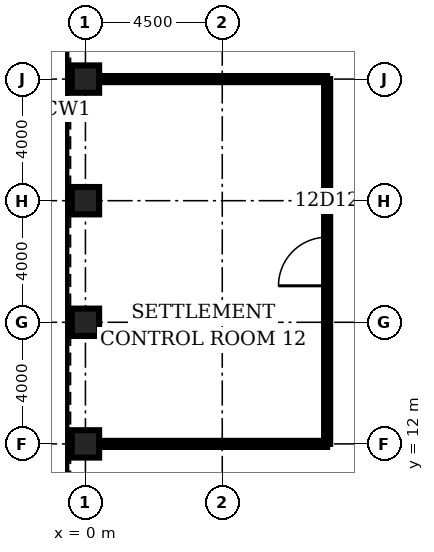
"""IFC4 building model, lengths in metres.
Left out: names, types, materials, properties, quantities, classifications, styles, units other than length and angle.
Written with IfcOpenShell. Run it as: python <this file> out.ifc"""

import sys

from ifc_helpers import new_model, si_unit, direction, frame, frame_2d, origin, origin_2d, place, context, subcontext, project, spatial, rectangle, hollow_rectangle, extrude, element, fill, save


model = new_model("IFC4")
c1 = context("Model", 3, precision=1e-05, world=origin(), true_north=direction((0.0, 1.0)))
c2 = subcontext(c1, "Body", "Model", "MODEL_VIEW")
j1 = project(units=[si_unit("LENGTHUNIT", "METRE"), si_unit("PLANEANGLEUNIT", "RADIAN")], contexts=[c1])
p1 = place(None, origin())
s1 = spatial("IfcSite", under=j1, at=p1, CompositionType="ELEMENT")
p2 = place(p1, origin())
s2 = spatial("IfcBuilding", under=s1, at=p2, CompositionType="ELEMENT")
p3 = place(p2, frame((0.0, 0.0, 59.0)))
s3 = spatial("IfcBuildingStorey", under=s2, at=p3, CompositionType="ELEMENT", Elevation=59.0)
for number, where, z_axis, x_axis in (
    (1, (0.0, 24.0, 0.0), (0.0, 0.0, 1.0), (1.0, 0.0, 0.0)),
    (2, (0.0, 20.0, 0.0), (0.0, 0.0, 1.0), (1.0, 0.0, 0.0)),
    (3, (0.0, 16.0, 0.0), (0.0, 0.0, 1.0), (1.0, 0.0, 0.0)),
    (4, (0.0, 12.0, 0.0), (0.0, 0.0, 1.0), (1.0, 0.0, 0.0)),
):
    element("IfcColumn", number, at=place(p3, frame(where, z_axis=z_axis, x_axis=x_axis)), inside=s3, PredefinedType="COLUMN", context=c2, shape_type="SweptSolid", body=[
        extrude(hollow_rectangle(XDim=0.9, YDim=0.9, WallThickness=0.12, at=origin_2d()), origin(), (0.0, 0.0, 1.0), 4.5),
    ])
for number, where, z_axis, x_axis in (
    (5, (0.45, 12.0, 0.0), (0.0, 0.0, 1.0), (1.0, 0.0, 0.0)),
    (6, (0.45, 24.0, 0.0), (0.0, 0.0, 1.0), (1.0, 0.0, 0.0)),
):
    element("IfcWall", number, at=place(p3, frame(where, z_axis=z_axis, x_axis=x_axis)), inside=s3, PredefinedType="PARTITIONING", context=c2, shape_type="SweptSolid", body=[
        extrude(rectangle(XDim=7.5, YDim=0.2, at=frame_2d((3.75, 0.0))), origin(), (0.0, 0.0, 1.0), 3.0),
    ])
p4 = place(p3, frame((7.95, 12.0, 0.0), z_axis=(0.0, 0.0, 1.0), x_axis=(0.0, 1.0, 0.0)))
e7 = element("IfcWall", 7, at=p4, inside=s3, PredefinedType="PARTITIONING", context=c2, shape_type="SweptSolid", body=[
    extrude(rectangle(XDim=12.0, YDim=0.2, at=frame_2d((6.0, 0.0))), origin(), (0.0, 0.0, 1.0), 3.0),
])
p5 = place(p4, frame((5.2, 0.0, 0.0)))
e8 = element("IfcOpeningElement", 8, at=p5, cuts=e7, PredefinedType="OPENING", context=c2, shape_type="SweptSolid", body=[
    extrude(rectangle(XDim=1.6, YDim=2.1, at=frame_2d((0.8, 1.05))), frame((0.0, 0.11, 0.0), z_axis=(0.0, -1.0, 0.0), x_axis=(1.0, 0.0, 0.0)), (0.0, 0.0, 1.0), 0.22),
])
p6 = place(p5, origin())
e9 = element("IfcDoor", 9, at=p6, inside=s3, OperationType="SINGLE_SWING_LEFT", PredefinedType="DOOR", context=c2, shape_type="SweptSolid", body=[
    extrude(rectangle(XDim=1.6, YDim=2.1, at=frame_2d((0.8, 1.05))), frame((0.0, 0.025, 0.0), z_axis=(0.0, -1.0, 0.0), x_axis=(1.0, 0.0, 0.0)), (0.0, 0.0, 1.0), 0.05),
])
fill(e8, e9)
save(model, sys.argv[1])
